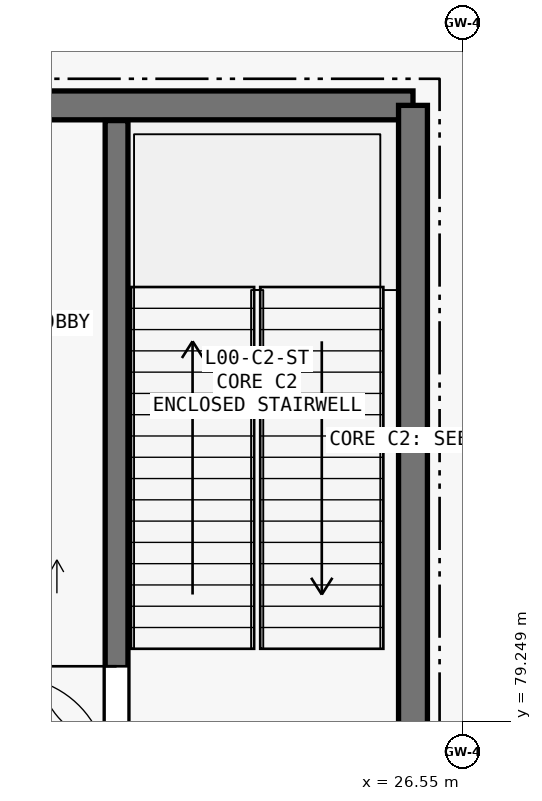
"""IFC4 building model, lengths in metres.
Left out: names, types, materials, properties, quantities, classifications, styles, units other than length and angle.
Written with IfcOpenShell. Run it as: python <this file> out.ifc"""

import sys

from ifc_helpers import new_model, si_unit, direction, frame, frame_2d, origin, place, context, subcontext, project, spatial, rectangle, extrude, element, fill, save


model = new_model("IFC4")
c1 = context("Model", 3, precision=1e-05, world=origin(), true_north=direction((0.0, 1.0)))
c2 = subcontext(c1, "Body", "Model", "MODEL_VIEW")
j1 = project(units=[si_unit("LENGTHUNIT", "METRE"), si_unit("PLANEANGLEUNIT", "RADIAN")], contexts=[c1])
p1 = place(None, origin())
s1 = spatial("IfcSite", under=j1, at=p1, CompositionType="ELEMENT")
p2 = place(p1, origin())
s2 = spatial("IfcBuilding", under=s1, at=p2, CompositionType="ELEMENT")
p3 = place(p2, origin())
s3 = spatial("IfcBuildingStorey", under=s2, at=p3, CompositionType="ELEMENT", Elevation=0.0)
p4 = place(p3, frame((25.9, 87.35, 0.0), z_axis=(0.0, 0.0, 1.0), x_axis=(-1.0, 0.0, 0.0)))
e1 = element("IfcWall", 1, at=p4, inside=s3, PredefinedType="SHEAR", context=c2, shape_type="SweptSolid", body=[
    extrude(rectangle(XDim=7.55, YDim=0.38, at=frame_2d((3.775, 0.0))), origin(), (0.0, 0.0, 1.0), 6.0),
])
p5 = place(p3, frame((25.9, 78.55, 0.0), z_axis=(0.0, 0.0, 1.0), x_axis=(0.0, 1.0, 0.0)))
e2 = element("IfcWall", 2, at=p5, inside=s3, PredefinedType="SHEAR", context=c2, shape_type="SweptSolid", body=[
    extrude(rectangle(XDim=8.8, YDim=0.38, at=frame_2d((4.4, 0.0))), origin(), (0.0, 0.0, 1.0), 6.0),
])
p6 = place(p3, frame((22.0, 78.75, 0.0), z_axis=(0.0, 0.0, 1.0), x_axis=(0.0, 1.0, 0.0)))
e3 = element("IfcWall", 3, at=p6, inside=s3, PredefinedType="SHEAR", context=c2, shape_type="SweptSolid", body=[
    extrude(rectangle(XDim=8.4, YDim=0.3, at=frame_2d((4.2, 0.0))), origin(), (0.0, 0.0, 1.0), 6.0),
])
p7 = place(p6, frame((0.2, 0.0, 0.0)))
e4 = element("IfcOpeningElement", 4, at=p7, cuts=e3, PredefinedType="OPENING", context=c2, shape_type="SweptSolid", body=[
    extrude(rectangle(XDim=1.02, YDim=2.1, at=frame_2d((0.51, 1.05))), frame((0.0, 0.16, 0.0), z_axis=(0.0, -1.0, 0.0), x_axis=(1.0, 0.0, 0.0)), (0.0, 0.0, 1.0), 0.32),
])
p8 = place(p7, origin())
e5 = element("IfcDoor", 5, at=p8, inside=s3, OperationType="SINGLE_SWING_RIGHT", PredefinedType="DOOR", context=c2, shape_type="SweptSolid", body=[
    extrude(rectangle(XDim=1.02, YDim=2.1, at=frame_2d((0.51, 1.05))), frame((0.0, 0.025, 0.0), z_axis=(0.0, -1.0, 0.0), x_axis=(1.0, 0.0, 0.0)), (0.0, 0.0, 1.0), 0.05),
])
fill(e4, e5)
save(model, sys.argv[1])
